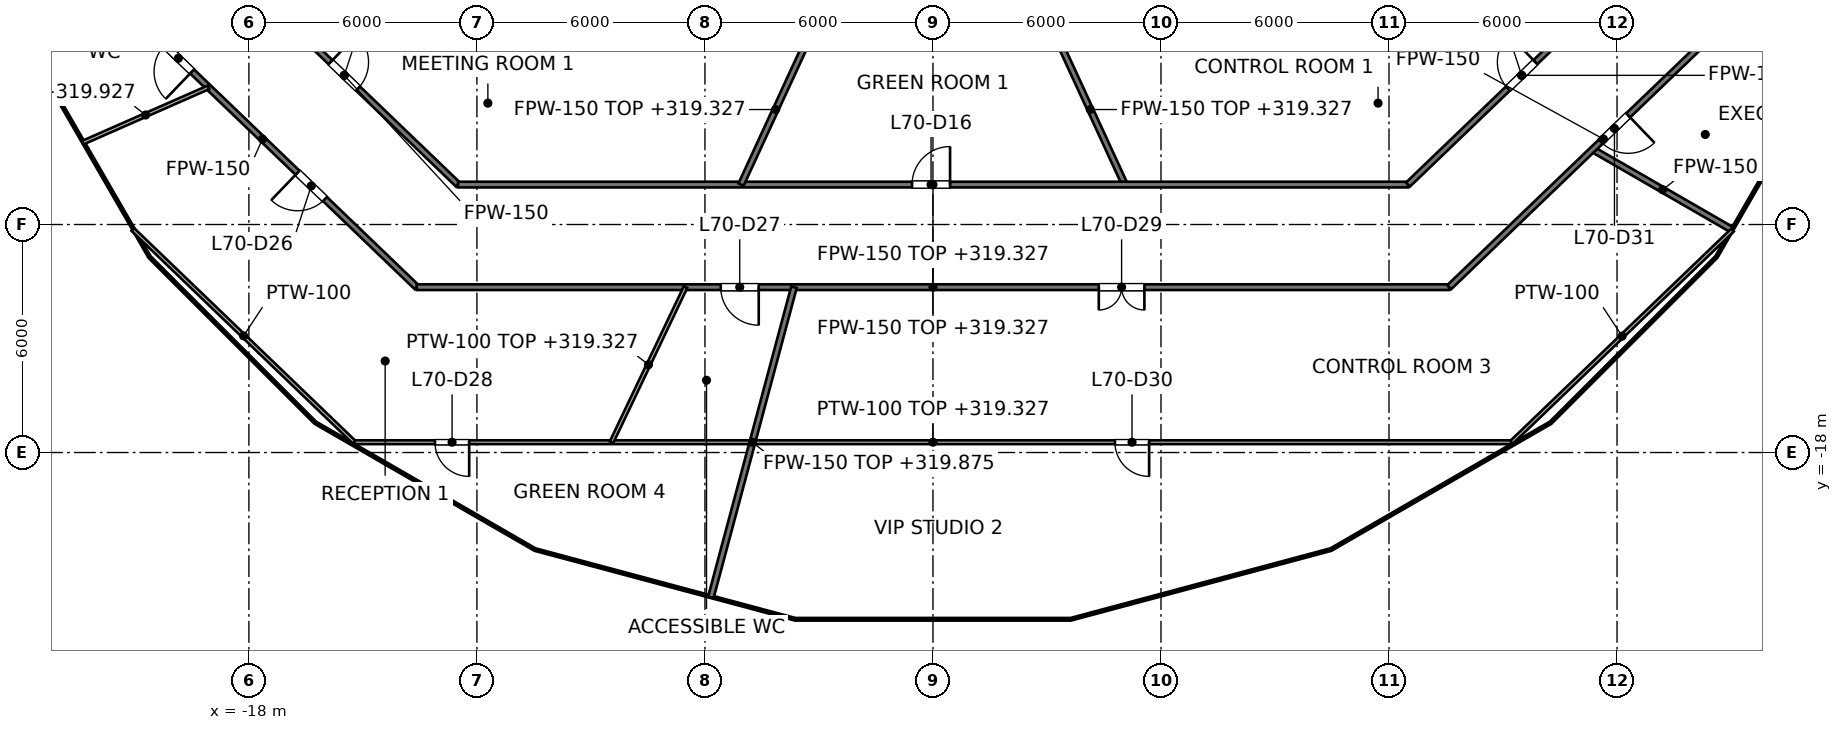
"""IFC4 building model, lengths in metres.
Left out: names, types, materials, properties, quantities, classifications, styles, units other than length and angle.
Written with IfcOpenShell. Run it as: python <this file> out.ifc"""

import sys

from ifc_helpers import new_model, si_unit, direction, frame, frame_2d, origin, place, context, subcontext, project, spatial, rectangle, extrude, element, fill, save


model = new_model("IFC4")
c1 = context("Model", 3, precision=1e-05, world=origin(), true_north=direction((0.0, 1.0)))
c2 = subcontext(c1, "Body", "Model", "MODEL_VIEW")
j1 = project(units=[si_unit("LENGTHUNIT", "METRE"), si_unit("PLANEANGLEUNIT", "RADIAN")], contexts=[c1])
p1 = place(None, origin())
s1 = spatial("IfcSite", under=j1, at=p1, CompositionType="ELEMENT")
p2 = place(p1, origin())
s2 = spatial("IfcBuilding", under=s1, at=p2, CompositionType="ELEMENT")
p3 = place(p2, frame((0.0, 0.0, 316.4)))
s3 = spatial("IfcBuildingStorey", under=s2, at=p3, CompositionType="ELEMENT", Elevation=316.4)
p4 = place(p3, frame((3.229, -7.0, 0.0), z_axis=(0.0, 0.0, 1.0), x_axis=(0.418762657012, -0.908095720226, 0.0)))
e1 = element("IfcWall", 1, at=p4, inside=s3, PredefinedType="PARTITIONING", context=c2, shape_type="SweptSolid", body=[
    extrude(rectangle(XDim=4.349, YDim=0.15, at=frame_2d((2.174, 0.0))), origin(), (0.0, 0.0, 1.0), 2.927),
])
p5 = place(p3, frame((-21.7, -5.855, 0.0), z_axis=(0.0, 0.0, 1.0), x_axis=(0.721260272646, -0.692664145963, 0.0)))
e2 = element("IfcWall", 2, at=p5, inside=s3, PredefinedType="PARTITIONING", context=c2, shape_type="SweptSolid", body=[
    extrude(rectangle(XDim=11.252, YDim=0.15, at=frame_2d((5.626, 0.0))), origin(), (0.0, 0.0, 1.0), 3.076),
])
p6 = place(p5, frame((2.057, 0.0, 0.0)))
e3 = element("IfcOpeningElement", 3, at=p6, cuts=e2, PredefinedType="OPENING", context=c2, shape_type="SweptSolid", body=[
    extrude(rectangle(XDim=1.0, YDim=2.1, at=frame_2d((0.5, 1.05))), frame((0.0, 0.075, 0.0), z_axis=(0.0, -1.0, 0.0), x_axis=(1.0, 0.0, 0.0)), (0.0, 0.0, 1.0), 0.15),
])
p7 = place(p5, frame((6.905, 0.0, 0.0)))
e4 = element("IfcOpeningElement", 4, at=p7, cuts=e2, PredefinedType="OPENING", context=c2, shape_type="SweptSolid", body=[
    extrude(rectangle(XDim=1.0, YDim=2.1, at=frame_2d((0.5, 1.05))), frame((0.0, 0.075, 0.0), z_axis=(0.0, -1.0, 0.0), x_axis=(1.0, 0.0, 0.0)), (0.0, 0.0, 1.0), 0.15),
])
p8 = place(p3, frame((-18.484, -5.2, 0.0), z_axis=(0.0, 0.0, 1.0), x_axis=(0.721258572397, -0.692665916401, 0.0)))
e5 = element("IfcWall", 5, at=p8, inside=s3, PredefinedType="PARTITIONING", context=c2, shape_type="SweptSolid", body=[
    extrude(rectangle(XDim=8.3, YDim=0.15, at=frame_2d((4.15, 0.0))), origin(), (0.0, 0.0, 1.0), 3.076),
])
p9 = place(p8, frame((3.65, 0.0, 0.0)))
e6 = element("IfcOpeningElement", 6, at=p9, cuts=e5, PredefinedType="OPENING", context=c2, shape_type="SweptSolid", body=[
    extrude(rectangle(XDim=1.0, YDim=2.1, at=frame_2d((0.5, 1.05))), frame((0.0, 0.075, 0.0), z_axis=(0.0, -1.0, 0.0), x_axis=(1.0, 0.0, 0.0)), (0.0, 0.0, 1.0), 0.15),
])
p10 = place(p3, frame((17.36, -10.023, 0.0), z_axis=(0.0, 0.0, 1.0), x_axis=(0.866027673501, -0.499996068715, 0.0)))
e7 = element("IfcWall", 7, at=p10, inside=s3, PredefinedType="PARTITIONING", context=c2, shape_type="SweptSolid", body=[
    extrude(rectangle(XDim=4.248, YDim=0.15, at=frame_2d((2.124, 0.0))), origin(), (0.0, 0.0, 1.0), 3.527),
])
p11 = place(p3, frame((-13.584, -13.649, 0.0), z_axis=(0.0, 0.0, 1.0), x_axis=(1.0, 0.0, 0.0)))
e8 = element("IfcWall", 8, at=p11, inside=s3, PredefinedType="PARTITIONING", context=c2, shape_type="SweptSolid", body=[
    extrude(rectangle(XDim=27.168, YDim=0.15, at=frame_2d((13.584, 0.0))), origin(), (0.0, 0.0, 1.0), 2.927),
])
p12 = place(p11, frame((8.0, 0.0, 0.0)))
e9 = element("IfcOpeningElement", 9, at=p12, cuts=e8, PredefinedType="OPENING", context=c2, shape_type="SweptSolid", body=[
    extrude(rectangle(XDim=1.0, YDim=2.1, at=frame_2d((0.5, 1.05))), frame((0.0, 0.075, 0.0), z_axis=(0.0, -1.0, 0.0), x_axis=(1.0, 0.0, 0.0)), (0.0, 0.0, 1.0), 0.15),
])
p13 = place(p11, frame((17.948, 0.0, 0.0)))
e10 = element("IfcOpeningElement", 10, at=p13, cuts=e8, PredefinedType="OPENING", context=c2, shape_type="SweptSolid", body=[
    extrude(rectangle(XDim=1.2, YDim=2.1, at=frame_2d((0.6, 1.05))), frame((0.0, 0.075, 0.0), z_axis=(0.0, -1.0, 0.0), x_axis=(1.0, 0.0, 0.0)), (0.0, 0.0, 1.0), 0.15),
])
p14 = place(p3, frame((-12.498, -10.949, 0.0), z_axis=(0.0, 0.0, 1.0), x_axis=(1.0, 0.0, 0.0)))
e11 = element("IfcWall", 11, at=p14, inside=s3, PredefinedType="PARTITIONING", context=c2, shape_type="SweptSolid", body=[
    extrude(rectangle(XDim=24.996, YDim=0.15, at=frame_2d((12.498, 0.0))), origin(), (0.0, 0.0, 1.0), 2.927),
])
p15 = place(p14, frame((11.948, 0.0, 0.0)))
e12 = element("IfcOpeningElement", 12, at=p15, cuts=e11, PredefinedType="OPENING", context=c2, shape_type="SweptSolid", body=[
    extrude(rectangle(XDim=1.0, YDim=2.1, at=frame_2d((0.5, 1.05))), frame((0.0, 0.075, 0.0), z_axis=(0.0, -1.0, 0.0), x_axis=(1.0, 0.0, 0.0)), (0.0, 0.0, 1.0), 0.15),
])
p16 = place(p3, frame((13.584, -13.649, 0.0), z_axis=(0.0, 0.0, 1.0), x_axis=(0.721260272646, 0.692664145963, 0.0)))
e13 = element("IfcWall", 13, at=p16, inside=s3, PredefinedType="PARTITIONING", context=c2, shape_type="SweptSolid", body=[
    extrude(rectangle(XDim=11.252, YDim=0.15, at=frame_2d((5.626, 0.0))), origin(), (0.0, 0.0, 1.0), 3.076),
])
p17 = place(p16, frame((5.529, 0.0, 0.0)))
e14 = element("IfcOpeningElement", 14, at=p17, cuts=e13, PredefinedType="OPENING", context=c2, shape_type="SweptSolid", body=[
    extrude(rectangle(XDim=1.0, YDim=2.1, at=frame_2d((0.5, 1.05))), frame((0.0, 0.075, 0.0), z_axis=(0.0, -1.0, 0.0), x_axis=(1.0, 0.0, 0.0)), (0.0, 0.0, 1.0), 0.15),
])
p18 = place(p3, frame((12.498, -10.949, 0.0), z_axis=(0.0, 0.0, 1.0), x_axis=(0.721258572397, 0.692665916401, 0.0)))
e15 = element("IfcWall", 15, at=p18, inside=s3, PredefinedType="PARTITIONING", context=c2, shape_type="SweptSolid", body=[
    extrude(rectangle(XDim=8.3, YDim=0.15, at=frame_2d((4.15, 0.0))), origin(), (0.0, 0.0, 1.0), 3.076),
])
p19 = place(p18, frame((3.649, 0.0, 0.0)))
e16 = element("IfcOpeningElement", 16, at=p19, cuts=e15, PredefinedType="OPENING", context=c2, shape_type="SweptSolid", body=[
    extrude(rectangle(XDim=1.0, YDim=2.1, at=frame_2d((0.5, 1.05))), frame((0.0, 0.075, 0.0), z_axis=(0.0, -1.0, 0.0), x_axis=(1.0, 0.0, 0.0)), (0.0, 0.0, 1.0), 0.15),
])
p20 = place(p3, frame((-5.05, -10.949, 0.0), z_axis=(0.0, 0.0, 1.0), x_axis=(0.418762657012, 0.908095720226, 0.0)))
e17 = element("IfcWall", 17, at=p20, inside=s3, PredefinedType="PARTITIONING", context=c2, shape_type="SweptSolid", body=[
    extrude(rectangle(XDim=4.349, YDim=0.15, at=frame_2d((2.174, 0.0))), origin(), (0.0, 0.0, 1.0), 2.927),
])
p21 = place(p3, frame((-5.845, -21.814, 0.0), z_axis=(0.0, 0.0, 1.0), x_axis=(0.258838102213, 0.96592071975, 0.0)))
e18 = element("IfcWall", 18, at=p21, inside=s3, PredefinedType="PARTITIONING", context=c2, shape_type="SweptSolid", body=[
    extrude(rectangle(XDim=8.453, YDim=0.15, at=frame_2d((4.227, 0.0))), origin(), (0.0, 0.0, 1.0), 3.475),
])
p22 = place(p3, frame((-21.054, -12.132, 0.0), z_axis=(0.0, 0.0, 1.0), x_axis=(0.721165088677, -0.692763245902, 0.0)))
e19 = element("IfcWall", 19, at=p22, inside=s3, PredefinedType="PARTITIONING", context=c2, shape_type="SweptSolid", body=[
    extrude(rectangle(XDim=8.08, YDim=0.1, at=frame_2d((4.04, 0.0))), origin(), (0.0, 0.0, 1.0), 2.995),
])
p23 = place(p3, frame((-15.226, -17.729, 0.0), z_axis=(0.0, 0.0, 1.0), x_axis=(1.0, 0.0, 0.0)))
e20 = element("IfcWall", 20, at=p23, inside=s3, PredefinedType="PARTITIONING", context=c2, shape_type="SweptSolid", body=[
    extrude(rectangle(XDim=30.452, YDim=0.1, at=frame_2d((15.226, 0.0))), origin(), (0.0, 0.0, 1.0), 2.927),
])
p24 = place(p23, frame((2.122, 0.0, 0.0)))
e21 = element("IfcOpeningElement", 21, at=p24, cuts=e20, PredefinedType="OPENING", context=c2, shape_type="SweptSolid", body=[
    extrude(rectangle(XDim=0.9, YDim=2.1, at=frame_2d((0.45, 1.05))), frame((0.0, 0.05, 0.0), z_axis=(0.0, -1.0, 0.0), x_axis=(1.0, 0.0, 0.0)), (0.0, 0.0, 1.0), 0.1),
])
p25 = place(p23, frame((20.014, 0.0, 0.0)))
e22 = element("IfcOpeningElement", 22, at=p25, cuts=e20, PredefinedType="OPENING", context=c2, shape_type="SweptSolid", body=[
    extrude(rectangle(XDim=0.9, YDim=2.1, at=frame_2d((0.45, 1.05))), frame((0.0, 0.05, 0.0), z_axis=(0.0, -1.0, 0.0), x_axis=(1.0, 0.0, 0.0)), (0.0, 0.0, 1.0), 0.1),
])
p26 = place(p3, frame((-22.373, -9.847, 0.0), z_axis=(0.0, 0.0, 1.0), x_axis=(0.915241401605, 0.402905915553, 0.0)))
e23 = element("IfcWall", 23, at=p26, inside=s3, PredefinedType="PARTITIONING", context=c2, shape_type="SweptSolid", body=[
    extrude(rectangle(XDim=3.619, YDim=0.1, at=frame_2d((1.809, 0.0))), origin(), (0.0, 0.0, 1.0), 3.527),
])
p27 = place(p3, frame((15.226, -17.729, 0.0), z_axis=(0.0, 0.0, 1.0), x_axis=(0.721260787097, 0.692663610273, 0.0)))
e24 = element("IfcWall", 24, at=p27, inside=s3, PredefinedType="PARTITIONING", context=c2, shape_type="SweptSolid", body=[
    extrude(rectangle(XDim=8.059, YDim=0.1, at=frame_2d((4.03, 0.0))), origin(), (0.0, 0.0, 1.0), 2.995),
])
p28 = place(p3, frame((-8.458, -17.729, 0.0), z_axis=(0.0, 0.0, 1.0), x_axis=(0.430501632586, 0.902589798491, 0.0)))
e25 = element("IfcWall", 25, at=p28, inside=s3, PredefinedType="PARTITIONING", context=c2, shape_type="SweptSolid", body=[
    extrude(rectangle(XDim=4.521, YDim=0.1, at=frame_2d((2.26, 0.0))), origin(), (0.0, 0.0, 1.0), 2.927),
])
p29 = place(p9, origin())
e26 = element("IfcDoor", 26, at=p29, inside=s3, OperationType="SINGLE_SWING_LEFT", PredefinedType="DOOR", context=c2, shape_type="SweptSolid", body=[
    extrude(rectangle(XDim=1.0, YDim=2.1, at=frame_2d((0.5, 1.05))), frame((0.0, 0.025, 0.0), z_axis=(0.0, -1.0, 0.0), x_axis=(1.0, 0.0, 0.0)), (0.0, 0.0, 1.0), 0.05),
])
fill(e6, e26)
p30 = place(p15, origin())
e27 = element("IfcDoor", 27, at=p30, inside=s3, OperationType="SINGLE_SWING_RIGHT", PredefinedType="DOOR", context=c2, shape_type="SweptSolid", body=[
    extrude(rectangle(XDim=1.0, YDim=2.1, at=frame_2d((0.5, 1.05))), frame((0.0, 0.025, 0.0), z_axis=(0.0, -1.0, 0.0), x_axis=(1.0, 0.0, 0.0)), (0.0, 0.0, 1.0), 0.05),
])
fill(e12, e27)
p31 = place(p19, origin())
e28 = element("IfcDoor", 28, at=p31, inside=s3, OperationType="SINGLE_SWING_RIGHT", PredefinedType="DOOR", context=c2, shape_type="SweptSolid", body=[
    extrude(rectangle(XDim=1.0, YDim=2.1, at=frame_2d((0.5, 1.05))), frame((0.0, 0.025, 0.0), z_axis=(0.0, -1.0, 0.0), x_axis=(1.0, 0.0, 0.0)), (0.0, 0.0, 1.0), 0.05),
])
fill(e16, e28)
p32 = place(p6, origin())
e29 = element("IfcDoor", 29, at=p32, inside=s3, OperationType="SINGLE_SWING_RIGHT", PredefinedType="DOOR", context=c2, shape_type="SweptSolid", body=[
    extrude(rectangle(XDim=1.0, YDim=2.1, at=frame_2d((0.5, 1.05))), frame((0.0, 0.025, 0.0), z_axis=(0.0, -1.0, 0.0), x_axis=(1.0, 0.0, 0.0)), (0.0, 0.0, 1.0), 0.05),
])
fill(e3, e29)
p33 = place(p7, origin())
e30 = element("IfcDoor", 30, at=p33, inside=s3, OperationType="SINGLE_SWING_LEFT", PredefinedType="DOOR", context=c2, shape_type="SweptSolid", body=[
    extrude(rectangle(XDim=1.0, YDim=2.1, at=frame_2d((0.5, 1.05))), frame((0.0, 0.025, 0.0), z_axis=(0.0, -1.0, 0.0), x_axis=(1.0, 0.0, 0.0)), (0.0, 0.0, 1.0), 0.05),
])
fill(e4, e30)
p34 = place(p12, origin())
e31 = element("IfcDoor", 31, at=p34, inside=s3, OperationType="SINGLE_SWING_RIGHT", PredefinedType="DOOR", context=c2, shape_type="SweptSolid", body=[
    extrude(rectangle(XDim=1.0, YDim=2.1, at=frame_2d((0.5, 1.05))), frame((0.0, 0.025, 0.0), z_axis=(0.0, -1.0, 0.0), x_axis=(1.0, 0.0, 0.0)), (0.0, 0.0, 1.0), 0.05),
])
fill(e9, e31)
p35 = place(p24, origin())
e32 = element("IfcDoor", 32, at=p35, inside=s3, OperationType="SINGLE_SWING_RIGHT", PredefinedType="DOOR", context=c2, shape_type="SweptSolid", body=[
    extrude(rectangle(XDim=0.9, YDim=2.1, at=frame_2d((0.45, 1.05))), frame((0.0, 0.025, 0.0), z_axis=(0.0, -1.0, 0.0), x_axis=(1.0, 0.0, 0.0)), (0.0, 0.0, 1.0), 0.05),
])
fill(e21, e32)
p36 = place(p13, origin())
e33 = element("IfcDoor", 33, at=p36, inside=s3, OperationType="DOUBLE_DOOR_SINGLE_SWING", PredefinedType="DOOR", context=c2, shape_type="SweptSolid", body=[
    extrude(rectangle(XDim=1.2, YDim=2.1, at=frame_2d((0.6, 1.05))), frame((0.0, 0.025, 0.0), z_axis=(0.0, -1.0, 0.0), x_axis=(1.0, 0.0, 0.0)), (0.0, 0.0, 1.0), 0.05),
])
fill(e10, e33)
p37 = place(p25, origin())
e34 = element("IfcDoor", 34, at=p37, inside=s3, OperationType="SINGLE_SWING_RIGHT", PredefinedType="DOOR", context=c2, shape_type="SweptSolid", body=[
    extrude(rectangle(XDim=0.9, YDim=2.1, at=frame_2d((0.45, 1.05))), frame((0.0, 0.025, 0.0), z_axis=(0.0, -1.0, 0.0), x_axis=(1.0, 0.0, 0.0)), (0.0, 0.0, 1.0), 0.05),
])
fill(e22, e34)
p38 = place(p17, origin())
e35 = element("IfcDoor", 35, at=p38, inside=s3, OperationType="SINGLE_SWING_RIGHT", PredefinedType="DOOR", context=c2, shape_type="SweptSolid", body=[
    extrude(rectangle(XDim=1.0, YDim=2.1, at=frame_2d((0.5, 1.05))), frame((0.0, 0.025, 0.0), z_axis=(0.0, -1.0, 0.0), x_axis=(1.0, 0.0, 0.0)), (0.0, 0.0, 1.0), 0.05),
])
fill(e14, e35)
save(model, sys.argv[1])
